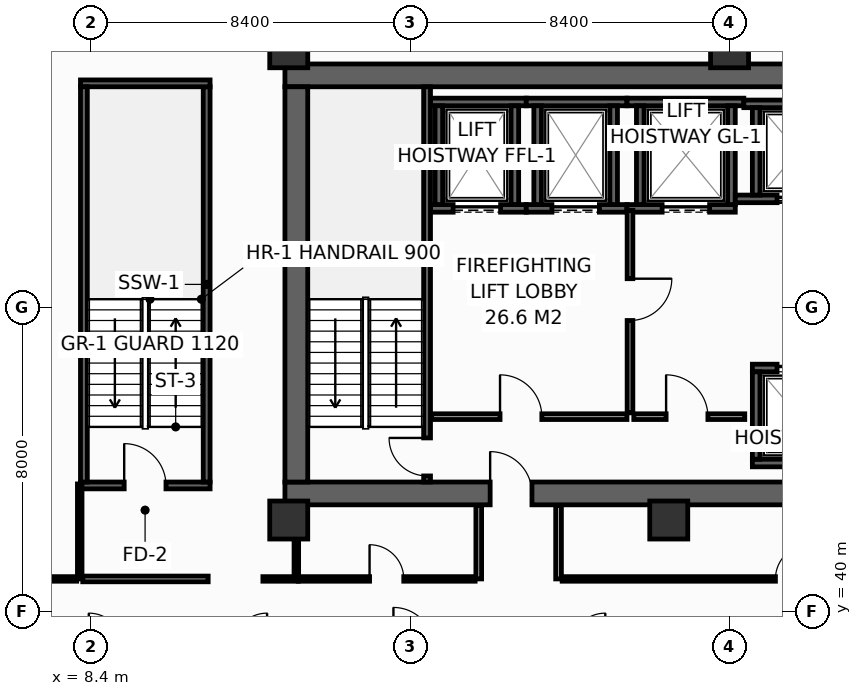
"""IFC4 building model, lengths in metres.
Left out: names, types, materials, properties, quantities, classifications, styles, units other than length and angle.
Written with IfcOpenShell. Run it as: python <this file> out.ifc"""

import sys

from ifc_helpers import new_model, si_unit, direction, frame, frame_2d, origin, origin_2d, place, context, subcontext, project, spatial, rectangle, hollow_rectangle, extrude, element, fill, save


model = new_model("IFC4")
c1 = context("Model", 3, precision=1e-05, world=origin(), true_north=direction((0.0, 1.0)))
c2 = subcontext(c1, "Body", "Model", "MODEL_VIEW")
j1 = project(units=[si_unit("LENGTHUNIT", "METRE"), si_unit("PLANEANGLEUNIT", "RADIAN")], contexts=[c1])
p1 = place(None, origin())
s1 = spatial("IfcSite", under=j1, at=p1, CompositionType="ELEMENT")
p2 = place(p1, origin())
s2 = spatial("IfcBuilding", under=s1, at=p2, CompositionType="ELEMENT")
p3 = place(p2, frame((0.0, 0.0, 119.2)))
s3 = spatial("IfcBuildingStorey", under=s2, at=p3, CompositionType="ELEMENT", Elevation=119.2)
p4 = place(p3, frame((13.5, 43.1, 0.0), z_axis=(0.0, 0.0, 1.0), x_axis=(1.0, 0.0, 0.0)))
e1 = element("IfcWall", 1, at=p4, inside=s3, PredefinedType="SHEAR", context=c2, shape_type="SweptSolid", body=[
    extrude(rectangle(XDim=32.9, YDim=0.6, at=frame_2d((16.45, 0.0))), origin(), (0.0, 0.0, 1.0), 3.95),
])
p5 = place(p4, frame((5.4, 0.0, 0.0)))
e2 = element("IfcOpeningElement", 2, at=p5, cuts=e1, PredefinedType="OPENING", context=c2, shape_type="SweptSolid", body=[
    extrude(rectangle(XDim=1.1, YDim=2.15, at=frame_2d((0.55, 1.075))), frame((0.0, 0.31, 0.0), z_axis=(0.0, -1.0, 0.0), x_axis=(1.0, 0.0, 0.0)), (0.0, 0.0, 1.0), 0.62),
])
p6 = place(p4, frame((25.6, 0.0, 0.0)))
e3 = element("IfcOpeningElement", 3, at=p6, cuts=e1, PredefinedType="OPENING", context=c2, shape_type="SweptSolid", body=[
    extrude(rectangle(XDim=1.1, YDim=2.15, at=frame_2d((0.55, 1.075))), frame((0.0, 0.31, 0.0), z_axis=(0.0, -1.0, 0.0), x_axis=(1.0, 0.0, 0.0)), (0.0, 0.0, 1.0), 0.62),
])
p7 = place(p3, frame((13.5, 54.1, 0.0), z_axis=(0.0, 0.0, 1.0), x_axis=(1.0, 0.0, 0.0)))
e4 = element("IfcWall", 4, at=p7, inside=s3, PredefinedType="SHEAR", context=c2, shape_type="SweptSolid", body=[
    extrude(rectangle(XDim=32.9, YDim=0.6, at=frame_2d((16.45, 0.0))), origin(), (0.0, 0.0, 1.0), 3.95),
])
p8 = place(p3, frame((13.8, 43.4, 0.0), z_axis=(0.0, 0.0, 1.0), x_axis=(0.0, 1.0, 0.0)))
e5 = element("IfcWall", 5, at=p8, inside=s3, PredefinedType="SHEAR", context=c2, shape_type="SweptSolid", body=[
    extrude(rectangle(XDim=10.4, YDim=0.6, at=frame_2d((5.2, 0.0))), origin(), (0.0, 0.0, 1.0), 3.95),
])
for number, where, z_axis, x_axis in (
    (6, (13.6, 54.8, 0.0), (0.0, 0.0, 1.0), (1.0, 0.0, 0.0)),
    (7, (25.2, 54.8, 0.0), (0.0, 0.0, 1.0), (1.0, 0.0, 0.0)),
    (8, (13.6, 42.4, 0.0), (0.0, 0.0, 1.0), (1.0, 0.0, 0.0)),
    (9, (23.6, 42.4, 0.0), (0.0, 0.0, 1.0), (1.0, 0.0, 0.0)),
):
    element("IfcColumn", number, at=place(p3, frame(where, z_axis=z_axis, x_axis=x_axis)), inside=s3, PredefinedType="COLUMN", context=c2, shape_type="SweptSolid", body=[
        extrude(hollow_rectangle(XDim=1.0, YDim=1.0, WallThickness=0.045, at=origin_2d()), origin(), (0.0, 0.0, 1.0), 4.4),
    ])
p9 = place(p3, frame((17.33, 50.6, 0.0), z_axis=(0.0, 0.0, 1.0), x_axis=(1.0, 0.0, 0.0)))
e10 = element("IfcWall", 10, at=p9, inside=s3, PredefinedType="SHEAR", context=c2, shape_type="SweptSolid", body=[
    extrude(rectangle(XDim=2.52, YDim=0.2, at=frame_2d((1.26, 0.0))), origin(), (0.0, 0.0, 1.0), 3.95),
])
p10 = place(p9, frame((0.595, 0.0, 0.0)))
e11 = element("IfcOpeningElement", 11, at=p10, cuts=e10, PredefinedType="OPENING", context=c2, shape_type="SweptSolid", body=[
    extrude(rectangle(XDim=1.25, YDim=2.3, at=frame_2d((0.625, 1.15))), frame((0.0, 0.11, 0.0), z_axis=(0.0, -1.0, 0.0), x_axis=(1.0, 0.0, 0.0)), (0.0, 0.0, 1.0), 0.22),
])
p11 = place(p3, frame((17.33, 53.4, 0.0), z_axis=(0.0, 0.0, 1.0), x_axis=(1.0, 0.0, 0.0)))
e12 = element("IfcWall", 12, at=p11, inside=s3, PredefinedType="SHEAR", context=c2, shape_type="SweptSolid", body=[
    extrude(rectangle(XDim=2.52, YDim=0.2, at=frame_2d((1.26, 0.0))), origin(), (0.0, 0.0, 1.0), 3.95),
])
for number, where, z_axis, x_axis in (
    (13, (17.55, 50.7, 0.0), (0.0, 0.0, 1.0), (0.0, 1.0, 0.0)),
    (14, (19.55, 50.7, 0.0), (0.0, 0.0, 1.0), (0.0, 1.0, 0.0)),
):
    element("IfcWall", number, at=place(p3, frame(where, z_axis=z_axis, x_axis=x_axis)), inside=s3, PredefinedType="SHEAR", context=c2, shape_type="SweptSolid", body=[
        extrude(rectangle(XDim=2.6, YDim=0.2, at=frame_2d((1.3, 0.0))), origin(), (0.0, 0.0, 1.0), 3.95),
    ])
p12 = place(p3, frame((19.85, 50.6, 0.0), z_axis=(0.0, 0.0, 1.0), x_axis=(1.0, 0.0, 0.0)))
e15 = element("IfcWall", 15, at=p12, inside=s3, PredefinedType="SHEAR", context=c2, shape_type="SweptSolid", body=[
    extrude(rectangle(XDim=2.65, YDim=0.2, at=frame_2d((1.325, 0.0))), origin(), (0.0, 0.0, 1.0), 3.95),
])
p13 = place(p12, frame((0.675, 0.0, 0.0)))
e16 = element("IfcOpeningElement", 16, at=p13, cuts=e15, PredefinedType="OPENING", context=c2, shape_type="SweptSolid", body=[
    extrude(rectangle(XDim=1.25, YDim=2.3, at=frame_2d((0.625, 1.15))), frame((0.0, 0.11, 0.0), z_axis=(0.0, -1.0, 0.0), x_axis=(1.0, 0.0, 0.0)), (0.0, 0.0, 1.0), 0.22),
])
p14 = place(p3, frame((19.85, 53.4, 0.0), z_axis=(0.0, 0.0, 1.0), x_axis=(1.0, 0.0, 0.0)))
e17 = element("IfcWall", 17, at=p14, inside=s3, PredefinedType="SHEAR", context=c2, shape_type="SweptSolid", body=[
    extrude(rectangle(XDim=2.65, YDim=0.2, at=frame_2d((1.325, 0.0))), origin(), (0.0, 0.0, 1.0), 3.95),
])
for number, where, z_axis, x_axis in (
    (18, (20.15, 50.7, 0.0), (0.0, 0.0, 1.0), (0.0, 1.0, 0.0)),
    (19, (22.15, 50.7, 0.0), (0.0, 0.0, 1.0), (0.0, 1.0, 0.0)),
):
    element("IfcWall", number, at=place(p3, frame(where, z_axis=z_axis, x_axis=x_axis)), inside=s3, PredefinedType="SHEAR", context=c2, shape_type="SweptSolid", body=[
        extrude(rectangle(XDim=2.6, YDim=0.2, at=frame_2d((1.3, 0.0))), origin(), (0.0, 0.0, 1.0), 3.95),
    ])
p15 = place(p3, frame((22.5, 50.6, 0.0), z_axis=(0.0, 0.0, 1.0), x_axis=(1.0, 0.0, 0.0)))
e20 = element("IfcWall", 20, at=p15, inside=s3, PredefinedType="SHEAR", context=c2, shape_type="SweptSolid", body=[
    extrude(rectangle(XDim=2.85, YDim=0.2, at=frame_2d((1.425, 0.0))), origin(), (0.0, 0.0, 1.0), 3.95),
])
p16 = place(p15, frame((0.925, 0.0, 0.0)))
e21 = element("IfcOpeningElement", 21, at=p16, cuts=e20, PredefinedType="OPENING", context=c2, shape_type="SweptSolid", body=[
    extrude(rectangle(XDim=1.25, YDim=2.3, at=frame_2d((0.625, 1.15))), frame((0.0, 0.11, 0.0), z_axis=(0.0, -1.0, 0.0), x_axis=(1.0, 0.0, 0.0)), (0.0, 0.0, 1.0), 0.22),
])
p17 = place(p3, frame((22.5, 53.4, 0.0), z_axis=(0.0, 0.0, 1.0), x_axis=(1.0, 0.0, 0.0)))
e22 = element("IfcWall", 22, at=p17, inside=s3, PredefinedType="SHEAR", context=c2, shape_type="SweptSolid", body=[
    extrude(rectangle(XDim=3.075, YDim=0.2, at=frame_2d((1.538, 0.0))), origin(), (0.0, 0.0, 1.0), 3.95),
])
for number, where, z_axis, x_axis in (
    (23, (22.85, 50.7, 0.0), (0.0, 0.0, 1.0), (0.0, 1.0, 0.0)),
    (24, (25.25, 50.7, 0.0), (0.0, 0.0, 1.0), (0.0, 1.0, 0.0)),
):
    element("IfcWall", number, at=place(p3, frame(where, z_axis=z_axis, x_axis=x_axis)), inside=s3, PredefinedType="SHEAR", context=c2, shape_type="SweptSolid", body=[
        extrude(rectangle(XDim=2.6, YDim=0.2, at=frame_2d((1.3, 0.0))), origin(), (0.0, 0.0, 1.0), 3.95),
    ])
p18 = place(p3, frame((25.35, 50.85, 0.0), z_axis=(0.0, 0.0, 1.0), x_axis=(1.0, 0.0, 0.0)))
e25 = element("IfcWall", 25, at=p18, inside=s3, PredefinedType="SHEAR", context=c2, shape_type="SweptSolid", body=[
    extrude(rectangle(XDim=3.025, YDim=0.2, at=frame_2d((1.512, 0.0))), origin(), (0.0, 0.0, 1.0), 3.73),
])
p19 = place(p18, frame((1.1, 0.0, 0.0)))
e26 = element("IfcOpeningElement", 26, at=p19, cuts=e25, PredefinedType="OPENING", context=c2, shape_type="SweptSolid", body=[
    extrude(rectangle(XDim=1.1, YDim=2.2, at=frame_2d((0.55, 1.1))), frame((0.0, 0.11, 0.0), z_axis=(0.0, -1.0, 0.0), x_axis=(1.0, 0.0, 0.0)), (0.0, 0.0, 1.0), 0.22),
])
p20 = place(p3, frame((25.575, 53.35, 0.0), z_axis=(0.0, 0.0, 1.0), x_axis=(1.0, 0.0, 0.0)))
e27 = element("IfcWall", 27, at=p20, inside=s3, PredefinedType="SHEAR", context=c2, shape_type="SweptSolid", body=[
    extrude(rectangle(XDim=2.8, YDim=0.2, at=frame_2d((1.4, 0.0))), origin(), (0.0, 0.0, 1.0), 3.73),
])
p21 = place(p3, frame((25.9, 50.95, 0.0), z_axis=(0.0, 0.0, 1.0), x_axis=(0.0, 1.0, 0.0)))
e28 = element("IfcWall", 28, at=p21, inside=s3, PredefinedType="SHEAR", context=c2, shape_type="SweptSolid", body=[
    extrude(rectangle(XDim=2.3, YDim=0.2, at=frame_2d((1.15, 0.0))), origin(), (0.0, 0.0, 1.0), 3.73),
])
p22 = place(p3, frame((25.8, 43.9, 0.0), z_axis=(0.0, 0.0, 1.0), x_axis=(1.0, 0.0, 0.0)))
e29 = element("IfcWall", 29, at=p22, inside=s3, PredefinedType="SHEAR", context=c2, shape_type="SweptSolid", body=[
    extrude(rectangle(XDim=2.575, YDim=0.2, at=frame_2d((1.288, 0.0))), origin(), (0.0, 0.0, 1.0), 3.95),
])
p23 = place(p3, frame((25.8, 46.4, 0.0), z_axis=(0.0, 0.0, 1.0), x_axis=(1.0, 0.0, 0.0)))
e30 = element("IfcWall", 30, at=p23, inside=s3, PredefinedType="SHEAR", context=c2, shape_type="SweptSolid", body=[
    extrude(rectangle(XDim=2.575, YDim=0.2, at=frame_2d((1.288, 0.0))), origin(), (0.0, 0.0, 1.0), 3.95),
])
p24 = place(p23, frame((0.65, 0.0, 0.0)))
e31 = element("IfcOpeningElement", 31, at=p24, cuts=e30, PredefinedType="OPENING", context=c2, shape_type="SweptSolid", body=[
    extrude(rectangle(XDim=1.1, YDim=2.2, at=frame_2d((0.55, 1.1))), frame((0.0, 0.11, 0.0), z_axis=(0.0, -1.0, 0.0), x_axis=(1.0, 0.0, 0.0)), (0.0, 0.0, 1.0), 0.22),
])
p25 = place(p3, frame((25.9, 44.0, 0.0), z_axis=(0.0, 0.0, 1.0), x_axis=(0.0, 1.0, 0.0)))
e32 = element("IfcWall", 32, at=p25, inside=s3, PredefinedType="SHEAR", context=c2, shape_type="SweptSolid", body=[
    extrude(rectangle(XDim=2.3, YDim=0.2, at=frame_2d((1.15, 0.0))), origin(), (0.0, 0.0, 1.0), 3.95),
])
p26 = place(p3, frame((17.24, 43.4, 0.0), z_axis=(0.0, 0.0, 1.0), x_axis=(0.0, 1.0, 0.0)))
e33 = element("IfcWall", 33, at=p26, inside=s3, PredefinedType="SHEAR", context=c2, shape_type="SweptSolid", body=[
    extrude(rectangle(XDim=10.4, YDim=0.18, at=frame_2d((5.2, 0.0))), origin(), (0.0, 0.0, 1.0), 3.95),
])
p27 = place(p26, frame((0.16, 0.0, 0.0)))
e34 = element("IfcOpeningElement", 34, at=p27, cuts=e33, PredefinedType="OPENING", context=c2, shape_type="SweptSolid", body=[
    extrude(rectangle(XDim=1.0, YDim=2.15, at=frame_2d((0.5, 1.075))), frame((0.0, 0.1, 0.0), z_axis=(0.0, -1.0, 0.0), x_axis=(1.0, 0.0, 0.0)), (0.0, 0.0, 1.0), 0.2),
])
p28 = place(p3, frame((8.12, 43.31, 0.0), z_axis=(0.0, 0.0, 1.0), x_axis=(1.0, 0.0, 0.0)))
e35 = element("IfcWall", 35, at=p28, inside=s3, PredefinedType="SHEAR", context=c2, shape_type="SweptSolid", body=[
    extrude(rectangle(XDim=3.41, YDim=0.18, at=frame_2d((1.705, 0.0))), origin(), (0.0, 0.0, 1.0), 3.95),
])
p29 = place(p28, frame((1.15, 0.0, 0.0)))
e36 = element("IfcOpeningElement", 36, at=p29, cuts=e35, PredefinedType="OPENING", context=c2, shape_type="SweptSolid", body=[
    extrude(rectangle(XDim=1.1, YDim=2.15, at=frame_2d((0.55, 1.075))), frame((0.0, 0.1, 0.0), z_axis=(0.0, -1.0, 0.0), x_axis=(1.0, 0.0, 0.0)), (0.0, 0.0, 1.0), 0.2),
])
p30 = place(p3, frame((11.44, 43.4, 0.0), z_axis=(0.0, 0.0, 1.0), x_axis=(0.0, 1.0, 0.0)))
e37 = element("IfcWall", 37, at=p30, inside=s3, PredefinedType="SHEAR", context=c2, shape_type="SweptSolid", body=[
    extrude(rectangle(XDim=10.4, YDim=0.18, at=frame_2d((5.2, 0.0))), origin(), (0.0, 0.0, 1.0), 3.95),
])
p31 = place(p3, frame((11.53, 53.89, 0.0), z_axis=(0.0, 0.0, 1.0), x_axis=(-1.0, 0.0, 0.0)))
e38 = element("IfcWall", 38, at=p31, inside=s3, PredefinedType="SHEAR", context=c2, shape_type="SweptSolid", body=[
    extrude(rectangle(XDim=3.41, YDim=0.18, at=frame_2d((1.705, 0.0))), origin(), (0.0, 0.0, 1.0), 3.95),
])
p32 = place(p3, frame((8.21, 53.8, 0.0), z_axis=(0.0, 0.0, 1.0), x_axis=(0.0, -1.0, 0.0)))
e39 = element("IfcWall", 39, at=p32, inside=s3, PredefinedType="SHEAR", context=c2, shape_type="SweptSolid", body=[
    extrude(rectangle(XDim=10.4, YDim=0.18, at=frame_2d((5.2, 0.0))), origin(), (0.0, 0.0, 1.0), 3.95),
])
p33 = place(p3, frame((17.36, 45.12, 0.0), z_axis=(0.0, 0.0, 1.0), x_axis=(1.0, 0.0, 0.0)))
e40 = element("IfcWall", 40, at=p33, inside=s3, PredefinedType="PARTITIONING", context=c2, shape_type="SweptSolid", body=[
    extrude(rectangle(XDim=5.14, YDim=0.15, at=frame_2d((2.57, 0.0))), origin(), (0.0, 0.0, 1.0), 3.95),
])
p34 = place(p33, frame((1.8, 0.0, 0.0)))
e41 = element("IfcOpeningElement", 41, at=p34, cuts=e40, PredefinedType="OPENING", context=c2, shape_type="SweptSolid", body=[
    extrude(rectangle(XDim=1.1, YDim=2.15, at=frame_2d((0.55, 1.075))), frame((0.0, 0.085, 0.0), z_axis=(0.0, -1.0, 0.0), x_axis=(1.0, 0.0, 0.0)), (0.0, 0.0, 1.0), 0.17),
])
p35 = place(p3, frame((22.58, 50.55, 0.0), z_axis=(0.0, 0.0, 1.0), x_axis=(0.0, -1.0, 0.0)))
e42 = element("IfcWall", 42, at=p35, inside=s3, PredefinedType="PARTITIONING", context=c2, shape_type="SweptSolid", body=[
    extrude(rectangle(XDim=5.33, YDim=0.15, at=frame_2d((2.665, 0.0))), origin(), (0.0, 0.0, 1.0), 3.95),
])
p36 = place(p35, frame((1.8, 0.0, 0.0)))
e43 = element("IfcOpeningElement", 43, at=p36, cuts=e42, PredefinedType="OPENING", context=c2, shape_type="SweptSolid", body=[
    extrude(rectangle(XDim=1.1, YDim=2.15, at=frame_2d((0.55, 1.075))), frame((0.0, 0.085, 0.0), z_axis=(0.0, -1.0, 0.0), x_axis=(1.0, 0.0, 0.0)), (0.0, 0.0, 1.0), 0.17),
])
p37 = place(p3, frame((22.68, 45.12, 0.0), z_axis=(0.0, 0.0, 1.0), x_axis=(1.0, 0.0, 0.0)))
e44 = element("IfcWall", 44, at=p37, inside=s3, PredefinedType="PARTITIONING", context=c2, shape_type="SweptSolid", body=[
    extrude(rectangle(XDim=2.92, YDim=0.15, at=frame_2d((1.46, 0.0))), origin(), (0.0, 0.0, 1.0), 3.95),
])
p38 = place(p37, frame((0.85, 0.0, 0.0)))
e45 = element("IfcOpeningElement", 45, at=p38, cuts=e44, PredefinedType="OPENING", context=c2, shape_type="SweptSolid", body=[
    extrude(rectangle(XDim=1.1, YDim=2.15, at=frame_2d((0.55, 1.075))), frame((0.0, 0.085, 0.0), z_axis=(0.0, -1.0, 0.0), x_axis=(1.0, 0.0, 0.0)), (0.0, 0.0, 1.0), 0.17),
])
p39 = place(p3, frame((12.92, 40.85, 0.0), z_axis=(0.0, 0.0, 1.0), x_axis=(1.0, 0.0, 0.0)))
e46 = element("IfcWall", 46, at=p39, inside=s3, PredefinedType="PARTITIONING", context=c2, shape_type="SweptSolid", body=[
    extrude(rectangle(XDim=0.93, YDim=0.12, at=frame_2d((0.465, 0.0))), origin(), (0.0, 0.0, 1.0), 3.95),
])
p40 = place(p3, frame((13.8, 40.93, 0.0), z_axis=(0.0, 0.0, 1.0), x_axis=(0.0, 1.0, 0.0)))
e47 = element("IfcWall", 47, at=p40, inside=s3, PredefinedType="PARTITIONING", context=c2, shape_type="SweptSolid", body=[
    extrude(rectangle(XDim=1.85, YDim=0.12, at=frame_2d((0.925, 0.0))), origin(), (0.0, 0.0, 1.0), 3.95),
])
p41 = place(p3, frame((8.1, 40.85, 0.0), z_axis=(0.0, 0.0, 1.0), x_axis=(0.0, 1.0, 0.0)))
e48 = element("IfcWall", 48, at=p41, inside=s3, PredefinedType="PARTITIONING", context=c2, shape_type="SweptSolid", body=[
    extrude(rectangle(XDim=2.5, YDim=0.12, at=frame_2d((1.25, 0.0))), origin(), (0.0, 0.0, 1.0), 3.135),
])
p42 = place(p3, frame((8.18, 40.85, 0.0), z_axis=(0.0, 0.0, 1.0), x_axis=(1.0, 0.0, 0.0)))
e49 = element("IfcWall", 49, at=p42, inside=s3, PredefinedType="PARTITIONING", context=c2, shape_type="SweptSolid", body=[
    extrude(rectangle(XDim=3.3, YDim=0.15, at=frame_2d((1.65, 0.0))), origin(), (0.0, 0.0, 1.0), 3.95),
])
p43 = place(p3, frame((5.992, 40.85, 0.0), z_axis=(0.0, 0.0, 1.0), x_axis=(1.0, 0.0, 0.0)))
e50 = element("IfcWall", 50, at=p43, inside=s3, PredefinedType="PARTITIONING", context=c2, shape_type="SweptSolid", body=[
    extrude(rectangle(XDim=2.028, YDim=0.12, at=frame_2d((1.014, 0.0))), origin(), (0.0, 0.0, 1.0), 3.435),
])
for number, where, z_axis, x_axis in (
    (51, (18.6, 40.85, 0.0), (0.0, 0.0, 1.0), (0.0, 1.0, 0.0)),
    (52, (20.7, 40.85, 0.0), (0.0, 0.0, 1.0), (0.0, 1.0, 0.0)),
):
    element("IfcWall", number, at=place(p3, frame(where, z_axis=z_axis, x_axis=x_axis)), inside=s3, PredefinedType="PARTITIONING", context=c2, shape_type="SweptSolid", body=[
        extrude(rectangle(XDim=1.93, YDim=0.15, at=frame_2d((0.965, 0.0))), origin(), (0.0, 0.0, 1.0), 3.95),
    ])
p44 = place(p3, frame((13.85, 40.85, 0.0), z_axis=(0.0, 0.0, 1.0), x_axis=(1.0, 0.0, 0.0)))
e53 = element("IfcWall", 53, at=p44, inside=s3, PredefinedType="PARTITIONING", context=c2, shape_type="SweptSolid", body=[
    extrude(rectangle(XDim=4.655, YDim=0.12, at=frame_2d((2.327, 0.0))), origin(), (0.0, 0.0, 1.0), 3.95),
])
p45 = place(p44, frame((1.877, 0.0, 0.0)))
e54 = element("IfcOpeningElement", 54, at=p45, cuts=e53, PredefinedType="OPENING", context=c2, shape_type="SweptSolid", body=[
    extrude(rectangle(XDim=0.9, YDim=2.1, at=frame_2d((0.45, 1.05))), frame((0.0, 0.07, 0.0), z_axis=(0.0, -1.0, 0.0), x_axis=(1.0, 0.0, 0.0)), (0.0, 0.0, 1.0), 0.14),
])
p46 = place(p3, frame((20.795, 40.85, 0.0), z_axis=(0.0, 0.0, 1.0), x_axis=(1.0, 0.0, 0.0)))
e55 = element("IfcWall", 55, at=p46, inside=s3, PredefinedType="PARTITIONING", context=c2, shape_type="SweptSolid", body=[
    extrude(rectangle(XDim=12.125, YDim=0.12, at=frame_2d((6.062, 0.0))), origin(), (0.0, 0.0, 1.0), 3.135),
])
p47 = place(p46, frame((5.612, 0.0, 0.0)))
e56 = element("IfcOpeningElement", 56, at=p47, cuts=e55, PredefinedType="OPENING", context=c2, shape_type="SweptSolid", body=[
    extrude(rectangle(XDim=0.9, YDim=2.1, at=frame_2d((0.45, 1.05))), frame((0.0, 0.07, 0.0), z_axis=(0.0, -1.0, 0.0), x_axis=(1.0, 0.0, 0.0)), (0.0, 0.0, 1.0), 0.14),
])
p48 = place(p10, origin())
e57 = element("IfcDoor", 57, at=p48, inside=s3, OperationType="SLIDING_TO_LEFT", PredefinedType="DOOR", context=c2, shape_type="SweptSolid", body=[
    extrude(rectangle(XDim=1.25, YDim=2.3, at=frame_2d((0.625, 1.15))), frame((0.0, 0.025, 0.0), z_axis=(0.0, -1.0, 0.0), x_axis=(1.0, 0.0, 0.0)), (0.0, 0.0, 1.0), 0.05),
])
fill(e11, e57)
p49 = place(p13, origin())
e58 = element("IfcDoor", 58, at=p49, inside=s3, OperationType="SLIDING_TO_LEFT", PredefinedType="DOOR", context=c2, shape_type="SweptSolid", body=[
    extrude(rectangle(XDim=1.25, YDim=2.3, at=frame_2d((0.625, 1.15))), frame((0.0, 0.025, 0.0), z_axis=(0.0, -1.0, 0.0), x_axis=(1.0, 0.0, 0.0)), (0.0, 0.0, 1.0), 0.05),
])
fill(e16, e58)
p50 = place(p16, origin())
e59 = element("IfcDoor", 59, at=p50, inside=s3, OperationType="SLIDING_TO_LEFT", PredefinedType="DOOR", context=c2, shape_type="SweptSolid", body=[
    extrude(rectangle(XDim=1.25, YDim=2.3, at=frame_2d((0.625, 1.15))), frame((0.0, 0.025, 0.0), z_axis=(0.0, -1.0, 0.0), x_axis=(1.0, 0.0, 0.0)), (0.0, 0.0, 1.0), 0.05),
])
fill(e21, e59)
p51 = place(p19, origin())
e60 = element("IfcDoor", 60, at=p51, inside=s3, OperationType="SLIDING_TO_LEFT", PredefinedType="DOOR", context=c2, shape_type="SweptSolid", body=[
    extrude(rectangle(XDim=1.1, YDim=2.2, at=frame_2d((0.55, 1.1))), frame((0.0, 0.025, 0.0), z_axis=(0.0, -1.0, 0.0), x_axis=(1.0, 0.0, 0.0)), (0.0, 0.0, 1.0), 0.05),
])
fill(e26, e60)
p52 = place(p24, origin())
e61 = element("IfcDoor", 61, at=p52, inside=s3, OperationType="SLIDING_TO_LEFT", PredefinedType="DOOR", context=c2, shape_type="SweptSolid", body=[
    extrude(rectangle(XDim=1.1, YDim=2.2, at=frame_2d((0.55, 1.1))), frame((0.0, 0.025, 0.0), z_axis=(0.0, -1.0, 0.0), x_axis=(1.0, 0.0, 0.0)), (0.0, 0.0, 1.0), 0.05),
])
fill(e31, e61)
p53 = place(p27, origin())
e62 = element("IfcDoor", 62, at=p53, inside=s3, OperationType="SINGLE_SWING_RIGHT", PredefinedType="DOOR", context=c2, shape_type="SweptSolid", body=[
    extrude(rectangle(XDim=1.0, YDim=2.15, at=frame_2d((0.5, 1.075))), frame((0.0, 0.025, 0.0), z_axis=(0.0, -1.0, 0.0), x_axis=(1.0, 0.0, 0.0)), (0.0, 0.0, 1.0), 0.05),
])
fill(e34, e62)
p54 = place(p29, origin())
e63 = element("IfcDoor", 63, at=p54, inside=s3, OperationType="SINGLE_SWING_LEFT", PredefinedType="DOOR", context=c2, shape_type="SweptSolid", body=[
    extrude(rectangle(XDim=1.1, YDim=2.15, at=frame_2d((0.55, 1.075))), frame((0.0, 0.025, 0.0), z_axis=(0.0, -1.0, 0.0), x_axis=(1.0, 0.0, 0.0)), (0.0, 0.0, 1.0), 0.05),
])
fill(e36, e63)
p55 = place(p34, origin())
e64 = element("IfcDoor", 64, at=p55, inside=s3, OperationType="SINGLE_SWING_LEFT", PredefinedType="DOOR", context=c2, shape_type="SweptSolid", body=[
    extrude(rectangle(XDim=1.1, YDim=2.15, at=frame_2d((0.55, 1.075))), frame((0.0, 0.025, 0.0), z_axis=(0.0, -1.0, 0.0), x_axis=(1.0, 0.0, 0.0)), (0.0, 0.0, 1.0), 0.05),
])
fill(e41, e64)
p56 = place(p36, origin())
e65 = element("IfcDoor", 65, at=p56, inside=s3, OperationType="SINGLE_SWING_LEFT", PredefinedType="DOOR", context=c2, shape_type="SweptSolid", body=[
    extrude(rectangle(XDim=1.1, YDim=2.15, at=frame_2d((0.55, 1.075))), frame((0.0, 0.025, 0.0), z_axis=(0.0, -1.0, 0.0), x_axis=(1.0, 0.0, 0.0)), (0.0, 0.0, 1.0), 0.05),
])
fill(e43, e65)
p57 = place(p38, origin())
e66 = element("IfcDoor", 66, at=p57, inside=s3, OperationType="SINGLE_SWING_LEFT", PredefinedType="DOOR", context=c2, shape_type="SweptSolid", body=[
    extrude(rectangle(XDim=1.1, YDim=2.15, at=frame_2d((0.55, 1.075))), frame((0.0, 0.025, 0.0), z_axis=(0.0, -1.0, 0.0), x_axis=(1.0, 0.0, 0.0)), (0.0, 0.0, 1.0), 0.05),
])
fill(e45, e66)
p58 = place(p5, origin())
e67 = element("IfcDoor", 67, at=p58, inside=s3, OperationType="SINGLE_SWING_LEFT", PredefinedType="DOOR", context=c2, shape_type="SweptSolid", body=[
    extrude(rectangle(XDim=1.1, YDim=2.15, at=frame_2d((0.55, 1.075))), frame((0.0, 0.025, 0.0), z_axis=(0.0, -1.0, 0.0), x_axis=(1.0, 0.0, 0.0)), (0.0, 0.0, 1.0), 0.05),
])
fill(e2, e67)
p59 = place(p45, origin())
e68 = element("IfcDoor", 68, at=p59, inside=s3, OperationType="SINGLE_SWING_LEFT", PredefinedType="DOOR", context=c2, shape_type="SweptSolid", body=[
    extrude(rectangle(XDim=0.9, YDim=2.1, at=frame_2d((0.45, 1.05))), frame((0.0, 0.025, 0.0), z_axis=(0.0, -1.0, 0.0), x_axis=(1.0, 0.0, 0.0)), (0.0, 0.0, 1.0), 0.05),
])
fill(e54, e68)
p60 = place(p47, origin())
e69 = element("IfcDoor", 69, at=p60, inside=s3, OperationType="SINGLE_SWING_RIGHT", PredefinedType="DOOR", context=c2, shape_type="SweptSolid", body=[
    extrude(rectangle(XDim=0.9, YDim=2.1, at=frame_2d((0.45, 1.05))), frame((0.0, 0.025, 0.0), z_axis=(0.0, -1.0, 0.0), x_axis=(1.0, 0.0, 0.0)), (0.0, 0.0, 1.0), 0.05),
])
fill(e56, e69)
save(model, sys.argv[1])
